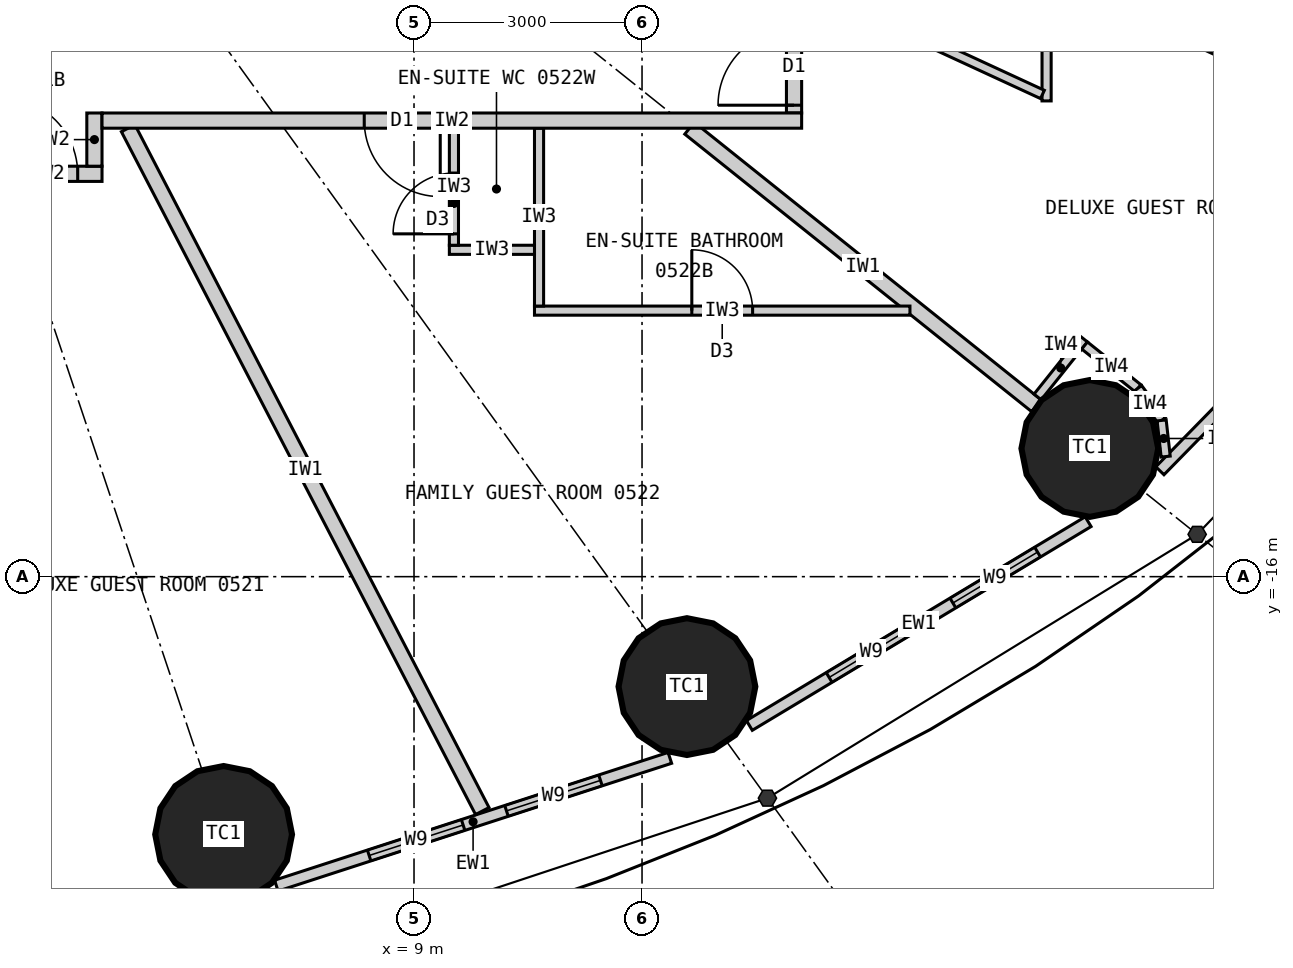
"""IFC4 building model, lengths in metres.
Left out: names, types, materials, properties, quantities, classifications, styles, units other than length and angle.
Written with IfcOpenShell. Run it as: python <this file> out.ifc"""

import sys

from ifc_helpers import new_model, si_unit, direction, frame, frame_2d, origin, origin_2d, place, context, subcontext, project, spatial, rectangle, circle, extrude, element, fill, save


model = new_model("IFC4")
c1 = context("Model", 3, precision=1e-05, world=origin(), true_north=direction((0.0, 1.0)))
c2 = subcontext(c1, "Body", "Model", "MODEL_VIEW")
j1 = project(units=[si_unit("LENGTHUNIT", "METRE"), si_unit("PLANEANGLEUNIT", "RADIAN")], contexts=[c1])
p1 = place(None, origin())
s1 = spatial("IfcSite", under=j1, at=p1, CompositionType="ELEMENT")
p2 = place(p1, origin())
s2 = spatial("IfcBuilding", under=s1, at=p2, CompositionType="ELEMENT")
p3 = place(p2, frame((0.0, 0.0, 29.4)))
s3 = spatial("IfcBuildingStorey", under=s2, at=p3, CompositionType="ELEMENT", Elevation=29.4)
for number, where, z_axis, x_axis in (
    (1, (6.495, -19.391, 0.0), (0.0, 0.0, 1.0), (1.0, 0.0, 0.0)),
    (2, (12.591, -17.447, 0.0), (0.0, 0.0, 1.0), (1.0, 0.0, 0.0)),
    (3, (17.892, -14.313, 0.0), (0.0, 0.0, 1.0), (1.0, 0.0, 0.0)),
):
    element("IfcColumn", number, at=place(p3, frame(where, z_axis=z_axis, x_axis=x_axis)), inside=s3, PredefinedType="COLUMN", context=c2, shape_type="SweptSolid", body=[
        extrude(circle(Radius=0.9, at=origin_2d()), origin(), (0.0, 0.0, 1.0), 3.3),
    ])
p4 = place(p3, frame((7.188, -20.065, 0.0), z_axis=(0.0, 0.0, 1.0), x_axis=(0.951138486029, 0.308764603532, 0.0)))
e4 = element("IfcWall", 4, at=p4, inside=s3, PredefinedType="ELEMENTEDWALL", context=c2, shape_type="SweptSolid", body=[
    extrude(rectangle(XDim=5.444, YDim=0.15, at=frame_2d((2.722, 0.0))), origin(), (0.0, 0.0, 1.0), 3.12),
])
p5 = place(p4, frame((1.284, 0.0, 0.9)))
e5 = element("IfcOpeningElement", 5, at=p5, cuts=e4, PredefinedType="OPENING", context=c2, shape_type="SweptSolid", body=[
    extrude(rectangle(XDim=1.3, YDim=1.9, at=frame_2d((0.65, 0.95))), frame((0.0, 0.085, 0.0), z_axis=(0.0, -1.0, 0.0), x_axis=(1.0, 0.0, 0.0)), (0.0, 0.0, 1.0), 0.17),
])
p6 = place(p4, frame((3.184, 0.0, 0.9)))
e6 = element("IfcOpeningElement", 6, at=p6, cuts=e4, PredefinedType="OPENING", context=c2, shape_type="SweptSolid", body=[
    extrude(rectangle(XDim=1.3, YDim=1.9, at=frame_2d((0.65, 0.95))), frame((0.0, 0.085, 0.0), z_axis=(0.0, -1.0, 0.0), x_axis=(1.0, 0.0, 0.0)), (0.0, 0.0, 1.0), 0.17),
])
p7 = place(p3, frame((13.412, -17.957, 0.0), z_axis=(0.0, 0.0, 1.0), x_axis=(0.856958191554, 0.515385931054, 0.0)))
e7 = element("IfcWall", 7, at=p7, inside=s3, PredefinedType="ELEMENTEDWALL", context=c2, shape_type="SweptSolid", body=[
    extrude(rectangle(XDim=5.201, YDim=0.15, at=frame_2d((2.601, 0.0))), origin(), (0.0, 0.0, 1.0), 3.12),
])
p8 = place(p7, frame((1.225, 0.0, 0.9)))
e8 = element("IfcOpeningElement", 8, at=p8, cuts=e7, PredefinedType="OPENING", context=c2, shape_type="SweptSolid", body=[
    extrude(rectangle(XDim=1.3, YDim=1.9, at=frame_2d((0.65, 0.95))), frame((0.0, 0.085, 0.0), z_axis=(0.0, -1.0, 0.0), x_axis=(1.0, 0.0, 0.0)), (0.0, 0.0, 1.0), 0.17),
])
p9 = place(p7, frame((3.125, 0.0, 0.9)))
e9 = element("IfcOpeningElement", 9, at=p9, cuts=e7, PredefinedType="OPENING", context=c2, shape_type="SweptSolid", body=[
    extrude(rectangle(XDim=1.3, YDim=1.9, at=frame_2d((0.65, 0.95))), frame((0.0, 0.085, 0.0), z_axis=(0.0, -1.0, 0.0), x_axis=(1.0, 0.0, 0.0)), (0.0, 0.0, 1.0), 0.17),
])
p10 = place(p3, frame((18.813, -14.607, 0.0), z_axis=(0.0, 0.0, 1.0), x_axis=(0.699612594083, 0.714522370679, 0.0)))
e10 = element("IfcWall", 10, at=p10, inside=s3, PredefinedType="ELEMENTEDWALL", context=c2, shape_type="SweptSolid", body=[
    extrude(rectangle(XDim=4.896, YDim=0.15, at=frame_2d((2.448, 0.0))), origin(), (0.0, 0.0, 1.0), 3.12),
])
p11 = place(p10, frame((1.077, 0.0, 0.9)))
e11 = element("IfcOpeningElement", 11, at=p11, cuts=e10, PredefinedType="OPENING", context=c2, shape_type="SweptSolid", body=[
    extrude(rectangle(XDim=1.3, YDim=1.9, at=frame_2d((0.65, 0.95))), frame((0.0, 0.085, 0.0), z_axis=(0.0, -1.0, 0.0), x_axis=(1.0, 0.0, 0.0)), (0.0, 0.0, 1.0), 0.17),
])
p12 = place(p10, frame((2.977, 0.0, 0.9)))
e12 = element("IfcOpeningElement", 12, at=p12, cuts=e10, PredefinedType="OPENING", context=c2, shape_type="SweptSolid", body=[
    extrude(rectangle(XDim=1.3, YDim=1.9, at=frame_2d((0.65, 0.95))), frame((0.0, 0.085, 0.0), z_axis=(0.0, -1.0, 0.0), x_axis=(1.0, 0.0, 0.0)), (0.0, 0.0, 1.0), 0.17),
])
p13 = place(p3, frame((5.239, -10.1, 0.0), z_axis=(0.0, 0.0, 1.0), x_axis=(0.460422783389, -0.887699758103, 0.0)))
e13 = element("IfcWall", 13, at=p13, inside=s3, PredefinedType="PARTITIONING", context=c2, shape_type="SweptSolid", body=[
    extrude(rectangle(XDim=10.12, YDim=0.2, at=frame_2d((5.06, 0.0))), origin(), (0.0, 0.0, 1.0), 3.12),
])
p14 = place(p3, frame((12.625, -10.1, 0.0), z_axis=(0.0, 0.0, 1.0), x_axis=(0.780872884676, -0.624689953479, 0.0)))
e14 = element("IfcWall", 14, at=p14, inside=s3, PredefinedType="PARTITIONING", context=c2, shape_type="SweptSolid", body=[
    extrude(rectangle(XDim=5.845, YDim=0.2, at=frame_2d((2.922, 0.0))), origin(), (0.0, 0.0, 1.0), 2.32),
])
p15 = place(p3, frame((14.1, -6.512, 0.0), z_axis=(0.0, 0.0, 1.0), x_axis=(0.907842433118, -0.41931147925, 0.0)))
e15 = element("IfcWall", 15, at=p15, inside=s3, PredefinedType="PARTITIONING", context=c2, shape_type="SweptSolid", body=[
    extrude(rectangle(XDim=7.823, YDim=0.2, at=frame_2d((3.912, 0.0))), origin(), (0.0, 0.0, 1.0), 2.32),
])
p16 = place(p3, frame((17.323, -8.101, 0.0), z_axis=(0.0, 0.0, 1.0), x_axis=(0.0, -1.0, 0.0)))
e16 = element("IfcWall", 16, at=p16, inside=s3, PredefinedType="PARTITIONING", context=c2, shape_type="SweptSolid", body=[
    extrude(rectangle(XDim=1.64, YDim=0.12, at=frame_2d((0.82, 0.0))), origin(), (0.0, 0.0, 1.0), 3.12),
])
p17 = place(p3, frame((14.1, -8.193, 0.0), z_axis=(0.0, 0.0, 1.0), x_axis=(0.907836493557, -0.419324338628, 0.0)))
e17 = element("IfcWall", 17, at=p17, inside=s3, PredefinedType="PARTITIONING", context=c2, shape_type="SweptSolid", body=[
    extrude(rectangle(XDim=3.49, YDim=0.12, at=frame_2d((1.745, 0.0))), origin(), (0.0, 0.0, 1.0), 3.12),
])
p18 = place(p17, frame((0.75, 0.0, 0.0)))
e18 = element("IfcOpeningElement", 18, at=p18, cuts=e17, PredefinedType="OPENING", context=c2, shape_type="SweptSolid", body=[
    extrude(rectangle(XDim=0.8, YDim=2.1, at=frame_2d((0.4, 1.05))), frame((0.0, 0.07, 0.0), z_axis=(0.0, -1.0, 0.0), x_axis=(1.0, 0.0, 0.0)), (0.0, 0.0, 1.0), 0.14),
])
p19 = place(p3, frame((15.525, -12.5, 0.0), z_axis=(0.0, 0.0, 1.0), x_axis=(-1.0, 0.0, 0.0)))
e19 = element("IfcWall", 19, at=p19, inside=s3, PredefinedType="PARTITIONING", context=c2, shape_type="SweptSolid", body=[
    extrude(rectangle(XDim=4.94, YDim=0.12, at=frame_2d((2.47, 0.0))), origin(), (0.0, 0.0, 1.0), 3.12),
])
p20 = place(p19, frame((2.07, 0.0, 0.0)))
e20 = element("IfcOpeningElement", 20, at=p20, cuts=e19, PredefinedType="OPENING", context=c2, shape_type="SweptSolid", body=[
    extrude(rectangle(XDim=0.8, YDim=2.1, at=frame_2d((0.4, 1.05))), frame((0.0, 0.07, 0.0), z_axis=(0.0, -1.0, 0.0), x_axis=(1.0, 0.0, 0.0)), (0.0, 0.0, 1.0), 0.14),
])
p21 = place(p3, frame((10.645, -10.1, 0.0), z_axis=(0.0, 0.0, 1.0), x_axis=(0.0, -1.0, 0.0)))
e21 = element("IfcWall", 21, at=p21, inside=s3, PredefinedType="PARTITIONING", context=c2, shape_type="SweptSolid", body=[
    extrude(rectangle(XDim=2.34, YDim=0.12, at=frame_2d((1.17, 0.0))), origin(), (0.0, 0.0, 1.0), 3.12),
])
p22 = place(p3, frame((10.585, -11.7, 0.0), z_axis=(0.0, 0.0, 1.0), x_axis=(-1.0, 0.0, 0.0)))
e22 = element("IfcWall", 22, at=p22, inside=s3, PredefinedType="PARTITIONING", context=c2, shape_type="SweptSolid", body=[
    extrude(rectangle(XDim=1.12, YDim=0.12, at=frame_2d((0.56, 0.0))), origin(), (0.0, 0.0, 1.0), 3.12),
])
p23 = place(p3, frame((9.525, -10.1, 0.0), z_axis=(0.0, 0.0, 1.0), x_axis=(0.0, -1.0, 0.0)))
e23 = element("IfcWall", 23, at=p23, inside=s3, PredefinedType="PARTITIONING", context=c2, shape_type="SweptSolid", body=[
    extrude(rectangle(XDim=1.54, YDim=0.12, at=frame_2d((0.77, 0.0))), origin(), (0.0, 0.0, 1.0), 3.12),
])
p24 = place(p23, frame((0.59, 0.0, 0.0)))
e24 = element("IfcOpeningElement", 24, at=p24, cuts=e23, PredefinedType="OPENING", context=c2, shape_type="SweptSolid", body=[
    extrude(rectangle(XDim=0.8, YDim=2.1, at=frame_2d((0.4, 1.05))), frame((0.0, 0.07, 0.0), z_axis=(0.0, -1.0, 0.0), x_axis=(1.0, 0.0, 0.0)), (0.0, 0.0, 1.0), 0.14),
])
p25 = place(p3, frame((4.895, -10.7, 0.0), z_axis=(0.0, 0.0, 1.0), x_axis=(-1.0, 0.0, 0.0)))
e25 = element("IfcWall", 25, at=p25, inside=s3, PredefinedType="PARTITIONING", context=c2, shape_type="SweptSolid", body=[
    extrude(rectangle(XDim=1.44, YDim=0.2, at=frame_2d((0.72, 0.0))), origin(), (0.0, 0.0, 1.0), 3.12),
])
p26 = place(p25, frame((0.32, 0.0, 0.0)))
e26 = element("IfcOpeningElement", 26, at=p26, cuts=e25, PredefinedType="OPENING", context=c2, shape_type="SweptSolid", body=[
    extrude(rectangle(XDim=1.0, YDim=2.2, at=frame_2d((0.5, 1.1))), frame((0.0, 0.11, 0.0), z_axis=(0.0, -1.0, 0.0), x_axis=(1.0, 0.0, 0.0)), (0.0, 0.0, 1.0), 0.22),
])
p27 = place(p3, frame((4.795, -9.9, 0.0), z_axis=(0.0, 0.0, 1.0), x_axis=(0.0, -1.0, 0.0)))
e27 = element("IfcWall", 27, at=p27, inside=s3, PredefinedType="PARTITIONING", context=c2, shape_type="SweptSolid", body=[
    extrude(rectangle(XDim=0.7, YDim=0.2, at=frame_2d((0.35, 0.0))), origin(), (0.0, 0.0, 1.0), 3.12),
])
p28 = place(p3, frame((14.0, -9.9, 0.0), z_axis=(0.0, 0.0, 1.0), x_axis=(0.0, 1.0, 0.0)))
e28 = element("IfcWall", 28, at=p28, inside=s3, PredefinedType="PARTITIONING", context=c2, shape_type="SweptSolid", body=[
    extrude(rectangle(XDim=5.827, YDim=0.2, at=frame_2d((2.914, 0.0))), origin(), (0.0, 0.0, 1.0), 3.12),
])
p29 = place(p28, frame((0.103, 0.0, 0.0)))
e29 = element("IfcOpeningElement", 29, at=p29, cuts=e28, PredefinedType="OPENING", context=c2, shape_type="SweptSolid", body=[
    extrude(rectangle(XDim=1.0, YDim=2.2, at=frame_2d((0.5, 1.1))), frame((0.0, 0.11, 0.0), z_axis=(0.0, -1.0, 0.0), x_axis=(1.0, 0.0, 0.0)), (0.0, 0.0, 1.0), 0.22),
])
p30 = place(p3, frame((14.1, -10.0, 0.0), z_axis=(0.0, 0.0, 1.0), x_axis=(-1.0, 0.0, 0.0)))
e30 = element("IfcWall", 30, at=p30, inside=s3, PredefinedType="PARTITIONING", context=c2, shape_type="SweptSolid", body=[
    extrude(rectangle(XDim=9.205, YDim=0.2, at=frame_2d((4.603, 0.0))), origin(), (0.0, 0.0, 1.0), 3.12),
])
p31 = place(p30, frame((4.755, 0.0, 0.0)))
e31 = element("IfcOpeningElement", 31, at=p31, cuts=e30, PredefinedType="OPENING", context=c2, shape_type="SweptSolid", body=[
    extrude(rectangle(XDim=1.0, YDim=2.2, at=frame_2d((0.5, 1.1))), frame((0.0, 0.11, 0.0), z_axis=(0.0, -1.0, 0.0), x_axis=(1.0, 0.0, 0.0)), (0.0, 0.0, 1.0), 0.22),
])
p32 = place(p3, frame((17.205, -13.635, 0.0), z_axis=(0.0, 0.0, 1.0), x_axis=(0.624756144097, 0.780819928289, 0.0)))
e32 = element("IfcWall", 32, at=p32, inside=s3, PredefinedType="PARTITIONING", context=c2, shape_type="SweptSolid", body=[
    extrude(rectangle(XDim=0.975, YDim=0.12, at=frame_2d((0.487, 0.0))), origin(), (0.0, 0.0, 1.0), 3.12),
])
p33 = place(p3, frame((17.823, -12.959, 0.0), z_axis=(0.0, 0.0, 1.0), x_axis=(0.780895271023, -0.624661969144, 0.0)))
e33 = element("IfcWall", 33, at=p33, inside=s3, PredefinedType="PARTITIONING", context=c2, shape_type="SweptSolid", body=[
    extrude(rectangle(XDim=0.9, YDim=0.12, at=frame_2d((0.45, 0.0))), origin(), (0.0, 0.0, 1.0), 3.12),
])
p34 = place(p3, frame((18.526, -13.521, 0.0), z_axis=(0.0, 0.0, 1.0), x_axis=(0.592532503205, -0.805546542818, 0.0)))
e34 = element("IfcWall", 34, at=p34, inside=s3, PredefinedType="PARTITIONING", context=c2, shape_type="SweptSolid", body=[
    extrude(rectangle(XDim=0.525, YDim=0.12, at=frame_2d((0.262, 0.0))), origin(), (0.0, 0.0, 1.0), 3.12),
])
p35 = place(p3, frame((18.837, -13.944, 0.0), z_axis=(0.0, 0.0, 1.0), x_axis=(0.110543348478, -0.993871303594, 0.0)))
e35 = element("IfcWall", 35, at=p35, inside=s3, PredefinedType="PARTITIONING", context=c2, shape_type="SweptSolid", body=[
    extrude(rectangle(XDim=0.479, YDim=0.12, at=frame_2d((0.24, 0.0))), origin(), (0.0, 0.0, 1.0), 3.12),
])
p36 = place(p5, origin())
e36 = element("IfcWindow", 36, at=p36, inside=s3, PartitioningType="SINGLE_PANEL", PredefinedType="WINDOW", context=c2, shape_type="SweptSolid", body=[
    extrude(rectangle(XDim=1.3, YDim=1.9, at=frame_2d((0.65, 0.95))), frame((0.0, 0.03, 0.0), z_axis=(0.0, -1.0, 0.0), x_axis=(1.0, 0.0, 0.0)), (0.0, 0.0, 1.0), 0.06),
])
fill(e5, e36)
p37 = place(p6, origin())
e37 = element("IfcWindow", 37, at=p37, inside=s3, PartitioningType="SINGLE_PANEL", PredefinedType="WINDOW", context=c2, shape_type="SweptSolid", body=[
    extrude(rectangle(XDim=1.3, YDim=1.9, at=frame_2d((0.65, 0.95))), frame((0.0, 0.03, 0.0), z_axis=(0.0, -1.0, 0.0), x_axis=(1.0, 0.0, 0.0)), (0.0, 0.0, 1.0), 0.06),
])
fill(e6, e37)
p38 = place(p8, origin())
e38 = element("IfcWindow", 38, at=p38, inside=s3, PartitioningType="SINGLE_PANEL", PredefinedType="WINDOW", context=c2, shape_type="SweptSolid", body=[
    extrude(rectangle(XDim=1.3, YDim=1.9, at=frame_2d((0.65, 0.95))), frame((0.0, 0.03, 0.0), z_axis=(0.0, -1.0, 0.0), x_axis=(1.0, 0.0, 0.0)), (0.0, 0.0, 1.0), 0.06),
])
fill(e8, e38)
p39 = place(p9, origin())
e39 = element("IfcWindow", 39, at=p39, inside=s3, PartitioningType="SINGLE_PANEL", PredefinedType="WINDOW", context=c2, shape_type="SweptSolid", body=[
    extrude(rectangle(XDim=1.3, YDim=1.9, at=frame_2d((0.65, 0.95))), frame((0.0, 0.03, 0.0), z_axis=(0.0, -1.0, 0.0), x_axis=(1.0, 0.0, 0.0)), (0.0, 0.0, 1.0), 0.06),
])
fill(e9, e39)
p40 = place(p29, origin())
e40 = element("IfcDoor", 40, at=p40, inside=s3, OperationType="SINGLE_SWING_LEFT", PredefinedType="DOOR", context=c2, shape_type="SweptSolid", body=[
    extrude(rectangle(XDim=1.0, YDim=2.2, at=frame_2d((0.5, 1.1))), frame((0.0, 0.025, 0.0), z_axis=(0.0, -1.0, 0.0), x_axis=(1.0, 0.0, 0.0)), (0.0, 0.0, 1.0), 0.05),
])
fill(e29, e40)
p41 = place(p26, origin())
e41 = element("IfcDoor", 41, at=p41, inside=s3, OperationType="SINGLE_SWING_RIGHT", PredefinedType="DOOR", context=c2, shape_type="SweptSolid", body=[
    extrude(rectangle(XDim=1.0, YDim=2.2, at=frame_2d((0.5, 1.1))), frame((0.0, 0.025, 0.0), z_axis=(0.0, -1.0, 0.0), x_axis=(1.0, 0.0, 0.0)), (0.0, 0.0, 1.0), 0.05),
])
fill(e26, e41)
p42 = place(p20, origin())
e42 = element("IfcDoor", 42, at=p42, inside=s3, OperationType="SINGLE_SWING_RIGHT", PredefinedType="DOOR", context=c2, shape_type="SweptSolid", body=[
    extrude(rectangle(XDim=0.8, YDim=2.1, at=frame_2d((0.4, 1.05))), frame((0.0, 0.025, 0.0), z_axis=(0.0, -1.0, 0.0), x_axis=(1.0, 0.0, 0.0)), (0.0, 0.0, 1.0), 0.05),
])
fill(e20, e42)
p43 = place(p24, origin())
e43 = element("IfcDoor", 43, at=p43, inside=s3, OperationType="SINGLE_SWING_RIGHT", PredefinedType="DOOR", context=c2, shape_type="SweptSolid", body=[
    extrude(rectangle(XDim=0.8, YDim=2.1, at=frame_2d((0.4, 1.05))), frame((0.0, 0.025, 0.0), z_axis=(0.0, -1.0, 0.0), x_axis=(1.0, 0.0, 0.0)), (0.0, 0.0, 1.0), 0.05),
])
fill(e24, e43)
p44 = place(p31, origin())
e44 = element("IfcDoor", 44, at=p44, inside=s3, OperationType="SINGLE_SWING_LEFT", PredefinedType="DOOR", context=c2, shape_type="SweptSolid", body=[
    extrude(rectangle(XDim=1.0, YDim=2.2, at=frame_2d((0.5, 1.1))), frame((0.0, 0.025, 0.0), z_axis=(0.0, -1.0, 0.0), x_axis=(1.0, 0.0, 0.0)), (0.0, 0.0, 1.0), 0.05),
])
fill(e31, e44)
save(model, sys.argv[1])
